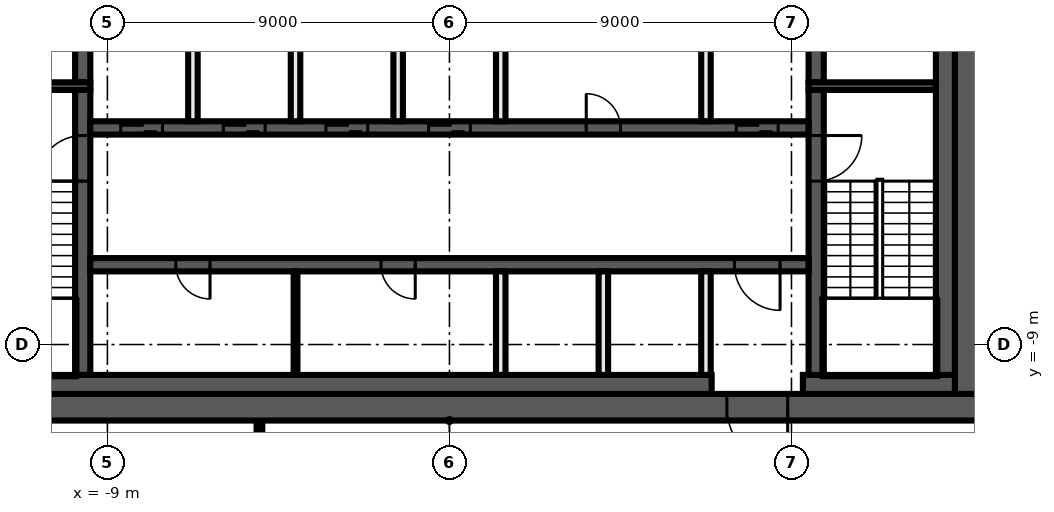
"""IFC4 building model, lengths in metres.
Left out: names, types, materials, properties, quantities, classifications, styles, units other than length and angle.
Written with IfcOpenShell. Run it as: python <this file> out.ifc"""

import sys

from ifc_helpers import new_model, si_unit, direction, frame, frame_2d, origin, place, context, subcontext, project, spatial, rectangle, extrude, element, fill, save


model = new_model("IFC4")
c1 = context("Model", 3, precision=1e-05, world=origin(), true_north=direction((0.0, 1.0)))
c2 = subcontext(c1, "Body", "Model", "MODEL_VIEW")
j1 = project(units=[si_unit("LENGTHUNIT", "METRE"), si_unit("PLANEANGLEUNIT", "RADIAN")], contexts=[c1])
p1 = place(None, origin())
s1 = spatial("IfcSite", under=j1, at=p1, CompositionType="ELEMENT")
p2 = place(p1, origin())
s2 = spatial("IfcBuilding", under=s1, at=p2, CompositionType="ELEMENT")
p3 = place(p2, frame((0.0, 0.0, 274.8)))
s3 = spatial("IfcBuildingStorey", under=s2, at=p3, CompositionType="ELEMENT", Elevation=274.8)
p4 = place(p3, frame((-5.0, -14.125, 0.0), z_axis=(0.0, 0.0, 1.0), x_axis=(0.0, 1.0, 0.0)))
e1 = element("IfcWall", 1, at=p4, inside=s3, PredefinedType="PARTITIONING", context=c2, shape_type="SweptSolid", body=[
    extrude(rectangle(XDim=3.125, YDim=0.15, at=frame_2d((1.562, 0.0))), origin(), (0.0, 0.0, 1.0), 3.82),
])
p5 = place(p3, frame((14.0, -10.65, 0.0), z_axis=(0.0, 0.0, 1.0), x_axis=(-1.0, 0.0, 0.0)))
e2 = element("IfcWall", 2, at=p5, inside=s3, PredefinedType="SHEAR", context=c2, shape_type="SweptSolid", body=[
    extrude(rectangle(XDim=28.0, YDim=0.7, at=frame_2d((14.0, 0.0))), origin(), (0.0, 0.0, 1.0), 3.82),
])
p6 = place(p5, frame((5.1, 0.0, 0.0)))
e3 = element("IfcOpeningElement", 3, at=p6, cuts=e2, PredefinedType="OPENING", context=c2, shape_type="SweptSolid", body=[
    extrude(rectangle(XDim=1.6, YDim=2.1, at=frame_2d((0.8, 1.05))), frame((0.0, 0.36, 0.0), z_axis=(0.0, -1.0, 0.0), x_axis=(1.0, 0.0, 0.0)), (0.0, 0.0, 1.0), 0.72),
])
p7 = place(p3, frame((13.65, 10.3, 0.0), z_axis=(0.0, 0.0, 1.0), x_axis=(0.0, -1.0, 0.0)))
e4 = element("IfcWall", 4, at=p7, inside=s3, PredefinedType="SHEAR", context=c2, shape_type="SweptSolid", body=[
    extrude(rectangle(XDim=20.6, YDim=0.7, at=frame_2d((10.3, 0.0))), origin(), (0.0, 0.0, 1.0), 3.82),
])
p8 = place(p3, frame((13.3, -10.05, 0.0), z_axis=(0.0, 0.0, 1.0), x_axis=(-1.0, 0.0, 0.0)))
e5 = element("IfcWall", 5, at=p8, inside=s3, PredefinedType="SHEAR", context=c2, shape_type="SweptSolid", body=[
    extrude(rectangle(XDim=4.0, YDim=0.5, at=frame_2d((2.0, 0.0))), origin(), (0.0, 0.0, 1.0), 3.82),
])
p9 = place(p3, frame((6.9, -10.05, 0.0), z_axis=(0.0, 0.0, 1.0), x_axis=(-1.0, 0.0, 0.0)))
e6 = element("IfcWall", 6, at=p9, inside=s3, PredefinedType="SHEAR", context=c2, shape_type="SweptSolid", body=[
    extrude(rectangle(XDim=20.2, YDim=0.5, at=frame_2d((10.1, 0.0))), origin(), (0.0, 0.0, 1.0), 3.82),
])
p10 = place(p3, frame((13.05, 9.8, 0.0), z_axis=(0.0, 0.0, 1.0), x_axis=(0.0, -1.0, 0.0)))
e7 = element("IfcWall", 7, at=p10, inside=s3, PredefinedType="SHEAR", context=c2, shape_type="SweptSolid", body=[
    extrude(rectangle(XDim=19.6, YDim=0.5, at=frame_2d((9.8, 0.0))), origin(), (0.0, 0.0, 1.0), 3.82),
])
p11 = place(p3, frame((9.65, -2.3, 0.0), z_axis=(0.0, 0.0, 1.0), x_axis=(0.0, -1.0, 0.0)))
e8 = element("IfcWall", 8, at=p11, inside=s3, PredefinedType="SHEAR", context=c2, shape_type="SweptSolid", body=[
    extrude(rectangle(XDim=7.5, YDim=0.4, at=frame_2d((3.75, 0.0))), origin(), (0.0, 0.0, 1.0), 3.82),
])
p12 = place(p11, frame((1.2, 0.0, 0.0)))
e9 = element("IfcOpeningElement", 9, at=p12, cuts=e8, PredefinedType="OPENING", context=c2, shape_type="SweptSolid", body=[
    extrude(rectangle(XDim=1.2, YDim=2.1, at=frame_2d((0.6, 1.05))), frame((0.0, 0.21, 0.0), z_axis=(0.0, -1.0, 0.0), x_axis=(1.0, 0.0, 0.0)), (0.0, 0.0, 1.0), 0.42),
])
p13 = place(p3, frame((9.65, 2.1, 0.0), z_axis=(0.0, 0.0, 1.0), x_axis=(0.0, -1.0, 0.0)))
e10 = element("IfcWall", 10, at=p13, inside=s3, PredefinedType="SHEAR", context=c2, shape_type="SweptSolid", body=[
    extrude(rectangle(XDim=4.2, YDim=0.4, at=frame_2d((2.1, 0.0))), origin(), (0.0, 0.0, 1.0), 3.82),
])
p14 = place(p13, frame((0.15, 0.0, 0.0)))
e11 = element("IfcOpeningElement", 11, at=p14, cuts=e10, PredefinedType="OPENING", context=c2, shape_type="SweptSolid", body=[
    extrude(rectangle(XDim=0.9, YDim=2.1, at=frame_2d((0.45, 1.05))), frame((0.0, 0.21, 0.0), z_axis=(0.0, -1.0, 0.0), x_axis=(1.0, 0.0, 0.0)), (0.0, 0.0, 1.0), 0.42),
])
p15 = place(p3, frame((-9.65, -9.8, 0.0), z_axis=(0.0, 0.0, 1.0), x_axis=(0.0, 1.0, 0.0)))
e12 = element("IfcWall", 12, at=p15, inside=s3, PredefinedType="SHEAR", context=c2, shape_type="SweptSolid", body=[
    extrude(rectangle(XDim=7.5, YDim=0.4, at=frame_2d((3.75, 0.0))), origin(), (0.0, 0.0, 1.0), 3.82),
])
p16 = place(p15, frame((5.1, 0.0, 0.0)))
e13 = element("IfcOpeningElement", 13, at=p16, cuts=e12, PredefinedType="OPENING", context=c2, shape_type="SweptSolid", body=[
    extrude(rectangle(XDim=1.2, YDim=2.1, at=frame_2d((0.6, 1.05))), frame((0.0, 0.21, 0.0), z_axis=(0.0, -1.0, 0.0), x_axis=(1.0, 0.0, 0.0)), (0.0, 0.0, 1.0), 0.42),
])
p17 = place(p3, frame((-9.65, -2.1, 0.0), z_axis=(0.0, 0.0, 1.0), x_axis=(0.0, 1.0, 0.0)))
e14 = element("IfcWall", 14, at=p17, inside=s3, PredefinedType="SHEAR", context=c2, shape_type="SweptSolid", body=[
    extrude(rectangle(XDim=4.2, YDim=0.4, at=frame_2d((2.1, 0.0))), origin(), (0.0, 0.0, 1.0), 3.82),
])
for number, where, z_axis, x_axis in (
    (15, (9.45, -2.2, 0.0), (0.0, 0.0, 1.0), (1.0, 0.0, 0.0)),
    (16, (-9.45, -2.2, 0.0), (0.0, 0.0, 1.0), (-1.0, 0.0, 0.0)),
):
    element("IfcWall", number, at=place(p3, frame(where, z_axis=z_axis, x_axis=x_axis)), inside=s3, PredefinedType="SHEAR", context=c2, shape_type="SweptSolid", body=[
        extrude(rectangle(XDim=3.35, YDim=0.2, at=frame_2d((1.675, 0.0))), origin(), (0.0, 0.0, 1.0), 3.82),
    ])
p18 = place(p3, frame((-9.45, -3.3, 0.0), z_axis=(0.0, 0.0, 1.0), x_axis=(1.0, 0.0, 0.0)))
e17 = element("IfcWall", 17, at=p18, inside=s3, PredefinedType="SHEAR", context=c2, shape_type="SweptSolid", body=[
    extrude(rectangle(XDim=18.9, YDim=0.35, at=frame_2d((9.45, 0.0))), origin(), (0.0, 0.0, 1.0), 3.82),
])
p19 = place(p18, frame((0.8, 0.0, 0.0)))
e18 = element("IfcOpeningElement", 18, at=p19, cuts=e17, PredefinedType="OPENING", context=c2, shape_type="SweptSolid", body=[
    extrude(rectangle(XDim=1.1, YDim=2.1, at=frame_2d((0.55, 1.05))), frame((0.0, 0.185, 0.0), z_axis=(0.0, -1.0, 0.0), x_axis=(1.0, 0.0, 0.0)), (0.0, 0.0, 1.0), 0.37),
])
p20 = place(p18, frame((3.5, 0.0, 0.0)))
e19 = element("IfcOpeningElement", 19, at=p20, cuts=e17, PredefinedType="OPENING", context=c2, shape_type="SweptSolid", body=[
    extrude(rectangle(XDim=1.1, YDim=2.1, at=frame_2d((0.55, 1.05))), frame((0.0, 0.185, 0.0), z_axis=(0.0, -1.0, 0.0), x_axis=(1.0, 0.0, 0.0)), (0.0, 0.0, 1.0), 0.37),
])
p21 = place(p18, frame((6.2, 0.0, 0.0)))
e20 = element("IfcOpeningElement", 20, at=p21, cuts=e17, PredefinedType="OPENING", context=c2, shape_type="SweptSolid", body=[
    extrude(rectangle(XDim=1.1, YDim=2.1, at=frame_2d((0.55, 1.05))), frame((0.0, 0.185, 0.0), z_axis=(0.0, -1.0, 0.0), x_axis=(1.0, 0.0, 0.0)), (0.0, 0.0, 1.0), 0.37),
])
p22 = place(p18, frame((8.9, 0.0, 0.0)))
e21 = element("IfcOpeningElement", 21, at=p22, cuts=e17, PredefinedType="OPENING", context=c2, shape_type="SweptSolid", body=[
    extrude(rectangle(XDim=1.1, YDim=2.1, at=frame_2d((0.55, 1.05))), frame((0.0, 0.185, 0.0), z_axis=(0.0, -1.0, 0.0), x_axis=(1.0, 0.0, 0.0)), (0.0, 0.0, 1.0), 0.37),
])
p23 = place(p18, frame((17.0, 0.0, 0.0)))
e22 = element("IfcOpeningElement", 22, at=p23, cuts=e17, PredefinedType="OPENING", context=c2, shape_type="SweptSolid", body=[
    extrude(rectangle(XDim=1.1, YDim=2.1, at=frame_2d((0.55, 1.05))), frame((0.0, 0.185, 0.0), z_axis=(0.0, -1.0, 0.0), x_axis=(1.0, 0.0, 0.0)), (0.0, 0.0, 1.0), 0.37),
])
p24 = place(p18, frame((13.05, 0.0, 0.0)))
e23 = element("IfcOpeningElement", 23, at=p24, cuts=e17, PredefinedType="OPENING", context=c2, shape_type="SweptSolid", body=[
    extrude(rectangle(XDim=0.9, YDim=2.1, at=frame_2d((0.45, 1.05))), frame((0.0, 0.185, 0.0), z_axis=(0.0, -1.0, 0.0), x_axis=(1.0, 0.0, 0.0)), (0.0, 0.0, 1.0), 0.37),
])
p25 = place(p3, frame((9.45, -6.9, 0.0), z_axis=(0.0, 0.0, 1.0), x_axis=(-1.0, 0.0, 0.0)))
e24 = element("IfcWall", 24, at=p25, inside=s3, PredefinedType="SHEAR", context=c2, shape_type="SweptSolid", body=[
    extrude(rectangle(XDim=18.9, YDim=0.35, at=frame_2d((9.45, 0.0))), origin(), (0.0, 0.0, 1.0), 3.82),
])
p26 = place(p25, frame((0.75, 0.0, 0.0)))
e25 = element("IfcOpeningElement", 25, at=p26, cuts=e24, PredefinedType="OPENING", context=c2, shape_type="SweptSolid", body=[
    extrude(rectangle(XDim=1.2, YDim=2.1, at=frame_2d((0.6, 1.05))), frame((0.0, 0.185, 0.0), z_axis=(0.0, -1.0, 0.0), x_axis=(1.0, 0.0, 0.0)), (0.0, 0.0, 1.0), 0.37),
])
p27 = place(p25, frame((15.75, 0.0, 0.0)))
e26 = element("IfcOpeningElement", 26, at=p27, cuts=e24, PredefinedType="OPENING", context=c2, shape_type="SweptSolid", body=[
    extrude(rectangle(XDim=0.9, YDim=2.1, at=frame_2d((0.45, 1.05))), frame((0.0, 0.185, 0.0), z_axis=(0.0, -1.0, 0.0), x_axis=(1.0, 0.0, 0.0)), (0.0, 0.0, 1.0), 0.37),
])
p28 = place(p25, frame((10.35, 0.0, 0.0)))
e27 = element("IfcOpeningElement", 27, at=p28, cuts=e24, PredefinedType="OPENING", context=c2, shape_type="SweptSolid", body=[
    extrude(rectangle(XDim=0.9, YDim=2.1, at=frame_2d((0.45, 1.05))), frame((0.0, 0.185, 0.0), z_axis=(0.0, -1.0, 0.0), x_axis=(1.0, 0.0, 0.0)), (0.0, 0.0, 1.0), 0.37),
])
for number, where, z_axis, x_axis in (
    (28, (6.75, -9.8, 0.0), (0.0, 0.0, 1.0), (0.0, 1.0, 0.0)),
    (29, (6.75, -3.125, 0.0), (0.0, 0.0, 1.0), (0.0, 1.0, 0.0)),
    (30, (4.05, -9.8, 0.0), (0.0, 0.0, 1.0), (0.0, 1.0, 0.0)),
    (31, (1.35, -9.8, 0.0), (0.0, 0.0, 1.0), (0.0, 1.0, 0.0)),
    (32, (1.35, -3.125, 0.0), (0.0, 0.0, 1.0), (0.0, 1.0, 0.0)),
    (33, (-1.35, -3.125, 0.0), (0.0, 0.0, 1.0), (0.0, 1.0, 0.0)),
):
    element("IfcWall", number, at=place(p3, frame(where, z_axis=z_axis, x_axis=x_axis)), inside=s3, PredefinedType="SOLIDWALL", context=c2, shape_type="SweptSolid", body=[
        extrude(rectangle(XDim=2.725, YDim=0.25, at=frame_2d((1.363, 0.0))), origin(), (0.0, 0.0, 1.0), 3.82),
    ])
p29 = place(p3, frame((-4.05, -9.8, 0.0), z_axis=(0.0, 0.0, 1.0), x_axis=(0.0, 1.0, 0.0)))
e34 = element("IfcWall", 34, at=p29, inside=s3, PredefinedType="PARTITIONING", context=c2, shape_type="SweptSolid", body=[
    extrude(rectangle(XDim=2.725, YDim=0.1, at=frame_2d((1.363, 0.0))), origin(), (0.0, 0.0, 1.0), 3.82),
])
for number, where, z_axis, x_axis in (
    (35, (-4.05, -3.125, 0.0), (0.0, 0.0, 1.0), (0.0, 1.0, 0.0)),
    (36, (-6.75, -3.125, 0.0), (0.0, 0.0, 1.0), (0.0, 1.0, 0.0)),
):
    element("IfcWall", number, at=place(p3, frame(where, z_axis=z_axis, x_axis=x_axis)), inside=s3, PredefinedType="SOLIDWALL", context=c2, shape_type="SweptSolid", body=[
        extrude(rectangle(XDim=2.725, YDim=0.25, at=frame_2d((1.363, 0.0))), origin(), (0.0, 0.0, 1.0), 3.82),
    ])
p30 = place(p19, origin())
e37 = element("IfcDoor", 37, at=p30, inside=s3, OperationType="DOUBLE_DOOR_SLIDING", PredefinedType="DOOR", context=c2, shape_type="SweptSolid", body=[
    extrude(rectangle(XDim=1.1, YDim=2.1, at=frame_2d((0.55, 1.05))), frame((0.0, 0.025, 0.0), z_axis=(0.0, -1.0, 0.0), x_axis=(1.0, 0.0, 0.0)), (0.0, 0.0, 1.0), 0.05),
])
fill(e18, e37)
p31 = place(p20, origin())
e38 = element("IfcDoor", 38, at=p31, inside=s3, OperationType="DOUBLE_DOOR_SLIDING", PredefinedType="DOOR", context=c2, shape_type="SweptSolid", body=[
    extrude(rectangle(XDim=1.1, YDim=2.1, at=frame_2d((0.55, 1.05))), frame((0.0, 0.025, 0.0), z_axis=(0.0, -1.0, 0.0), x_axis=(1.0, 0.0, 0.0)), (0.0, 0.0, 1.0), 0.05),
])
fill(e19, e38)
p32 = place(p21, origin())
e39 = element("IfcDoor", 39, at=p32, inside=s3, OperationType="DOUBLE_DOOR_SLIDING", PredefinedType="DOOR", context=c2, shape_type="SweptSolid", body=[
    extrude(rectangle(XDim=1.1, YDim=2.1, at=frame_2d((0.55, 1.05))), frame((0.0, 0.025, 0.0), z_axis=(0.0, -1.0, 0.0), x_axis=(1.0, 0.0, 0.0)), (0.0, 0.0, 1.0), 0.05),
])
fill(e20, e39)
p33 = place(p22, origin())
e40 = element("IfcDoor", 40, at=p33, inside=s3, OperationType="DOUBLE_DOOR_SLIDING", PredefinedType="DOOR", context=c2, shape_type="SweptSolid", body=[
    extrude(rectangle(XDim=1.1, YDim=2.1, at=frame_2d((0.55, 1.05))), frame((0.0, 0.025, 0.0), z_axis=(0.0, -1.0, 0.0), x_axis=(1.0, 0.0, 0.0)), (0.0, 0.0, 1.0), 0.05),
])
fill(e21, e40)
p34 = place(p23, origin())
e41 = element("IfcDoor", 41, at=p34, inside=s3, OperationType="DOUBLE_DOOR_SLIDING", PredefinedType="DOOR", context=c2, shape_type="SweptSolid", body=[
    extrude(rectangle(XDim=1.1, YDim=2.1, at=frame_2d((0.55, 1.05))), frame((0.0, 0.025, 0.0), z_axis=(0.0, -1.0, 0.0), x_axis=(1.0, 0.0, 0.0)), (0.0, 0.0, 1.0), 0.05),
])
fill(e22, e41)
p35 = place(p6, origin())
e42 = element("IfcDoor", 42, at=p35, inside=s3, OperationType="DOUBLE_DOOR_SINGLE_SWING", PredefinedType="DOOR", context=c2, shape_type="SweptSolid", body=[
    extrude(rectangle(XDim=1.6, YDim=2.1, at=frame_2d((0.8, 1.05))), frame((0.0, 0.025, 0.0), z_axis=(0.0, -1.0, 0.0), x_axis=(1.0, 0.0, 0.0)), (0.0, 0.0, 1.0), 0.05),
])
fill(e3, e42)
p36 = place(p26, origin())
e43 = element("IfcDoor", 43, at=p36, inside=s3, OperationType="SINGLE_SWING_LEFT", PredefinedType="DOOR", context=c2, shape_type="SweptSolid", body=[
    extrude(rectangle(XDim=1.2, YDim=2.1, at=frame_2d((0.6, 1.05))), frame((0.0, 0.025, 0.0), z_axis=(0.0, -1.0, 0.0), x_axis=(1.0, 0.0, 0.0)), (0.0, 0.0, 1.0), 0.05),
])
fill(e25, e43)
p37 = place(p24, origin())
e44 = element("IfcDoor", 44, at=p37, inside=s3, OperationType="SINGLE_SWING_RIGHT", PredefinedType="DOOR", context=c2, shape_type="SweptSolid", body=[
    extrude(rectangle(XDim=0.9, YDim=2.1, at=frame_2d((0.45, 1.05))), frame((0.0, 0.025, 0.0), z_axis=(0.0, -1.0, 0.0), x_axis=(1.0, 0.0, 0.0)), (0.0, 0.0, 1.0), 0.05),
])
fill(e23, e44)
p38 = place(p27, origin())
e45 = element("IfcDoor", 45, at=p38, inside=s3, OperationType="SINGLE_SWING_LEFT", PredefinedType="DOOR", context=c2, shape_type="SweptSolid", body=[
    extrude(rectangle(XDim=0.9, YDim=2.1, at=frame_2d((0.45, 1.05))), frame((0.0, 0.025, 0.0), z_axis=(0.0, -1.0, 0.0), x_axis=(1.0, 0.0, 0.0)), (0.0, 0.0, 1.0), 0.05),
])
fill(e26, e45)
p39 = place(p28, origin())
e46 = element("IfcDoor", 46, at=p39, inside=s3, OperationType="SINGLE_SWING_RIGHT", PredefinedType="DOOR", context=c2, shape_type="SweptSolid", body=[
    extrude(rectangle(XDim=0.9, YDim=2.1, at=frame_2d((0.45, 1.05))), frame((0.0, 0.025, 0.0), z_axis=(0.0, -1.0, 0.0), x_axis=(1.0, 0.0, 0.0)), (0.0, 0.0, 1.0), 0.05),
])
fill(e27, e46)
p40 = place(p12, origin())
e47 = element("IfcDoor", 47, at=p40, inside=s3, OperationType="SINGLE_SWING_RIGHT", PredefinedType="DOOR", context=c2, shape_type="SweptSolid", body=[
    extrude(rectangle(XDim=1.2, YDim=2.1, at=frame_2d((0.6, 1.05))), frame((0.0, 0.025, 0.0), z_axis=(0.0, -1.0, 0.0), x_axis=(1.0, 0.0, 0.0)), (0.0, 0.0, 1.0), 0.05),
])
fill(e9, e47)
p41 = place(p16, origin())
e48 = element("IfcDoor", 48, at=p41, inside=s3, OperationType="SINGLE_SWING_LEFT", PredefinedType="DOOR", context=c2, shape_type="SweptSolid", body=[
    extrude(rectangle(XDim=1.2, YDim=2.1, at=frame_2d((0.6, 1.05))), frame((0.0, 0.025, 0.0), z_axis=(0.0, -1.0, 0.0), x_axis=(1.0, 0.0, 0.0)), (0.0, 0.0, 1.0), 0.05),
])
fill(e13, e48)
save(model, sys.argv[1])
